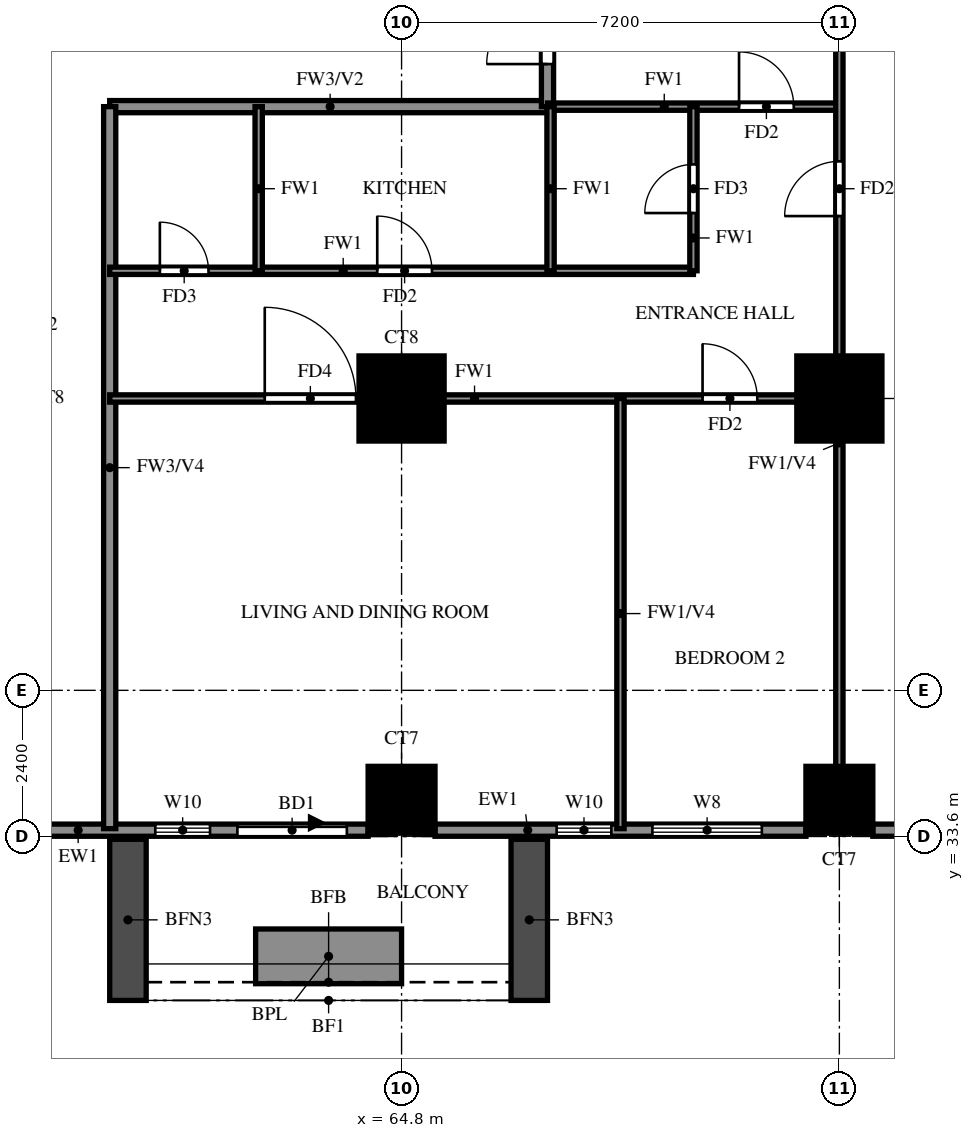
"""IFC4 building model, lengths in metres.
Left out: names, types, materials, properties, quantities, classifications, styles, units other than length and angle.
Written with IfcOpenShell. Run it as: python <this file> out.ifc"""

import sys

from ifc_helpers import new_model, si_unit, direction, frame, frame_2d, origin, origin_2d, place, context, subcontext, project, spatial, rectangle, extrude, source, transform, mapped, element, fill, save


model = new_model("IFC4")
c1 = context("Model", 3, precision=1e-05, world=origin(), true_north=direction((0.0, 1.0)))
c2 = subcontext(c1, "Body", "Model", "MODEL_VIEW")
j1 = project(units=[si_unit("LENGTHUNIT", "METRE"), si_unit("PLANEANGLEUNIT", "RADIAN")], contexts=[c1])
p1 = place(None, origin())
s1 = spatial("IfcSite", under=j1, at=p1, CompositionType="ELEMENT")
p2 = place(p1, origin())
s2 = spatial("IfcBuilding", under=s1, at=p2, CompositionType="ELEMENT")
p3 = place(p2, frame((0.0, 0.0, 37.5)))
s3 = spatial("IfcBuildingStorey", under=s2, at=p3, CompositionType="ELEMENT", Elevation=37.5)
m1 = source(origin(), c2, "Body", "SweptSolid", [
    extrude(rectangle(XDim=1.1, YDim=1.1, at=origin_2d()), origin(), (0.0, 0.0, 1.0), 3.18),
])
for number, where, z_axis, x_axis in (
    (1, (64.8, 34.2, 0.0), (0.0, 0.0, 1.0), (1.0, 0.0, 0.0)),
    (2, (72.0, 34.2, 0.0), (0.0, 0.0, 1.0), (1.0, 0.0, 0.0)),
):
    element("IfcColumn", number, at=place(p3, frame(where, z_axis=z_axis, x_axis=x_axis)), inside=s3, PredefinedType="COLUMN", context=c2, shape_type="MappedRepresentation", body=[
        mapped(m1, transform((0.0, 0.0, 0.0))),
    ])
m2 = source(origin(), c2, "Body", "SweptSolid", [
    extrude(rectangle(XDim=1.4, YDim=1.4, at=origin_2d()), origin(), (0.0, 0.0, 1.0), 3.18),
])
for number, where, z_axis, x_axis in (
    (3, (64.8, 40.8, 0.0), (0.0, 0.0, 1.0), (1.0, 0.0, 0.0)),
    (4, (72.0, 40.8, 0.0), (0.0, 0.0, 1.0), (1.0, 0.0, 0.0)),
):
    element("IfcColumn", number, at=place(p3, frame(where, z_axis=z_axis, x_axis=x_axis)), inside=s3, PredefinedType="COLUMN", context=c2, shape_type="MappedRepresentation", body=[
        mapped(m2, transform((0.0, 0.0, 0.0))),
    ])
p4 = place(p3, frame((78.74, 41.118, 0.0), z_axis=(0.0, 0.0, 1.0), x_axis=(-0.707106781187, 0.707106781187, 0.0)))
e5 = element("IfcWall", 5, at=p4, inside=s3, PredefinedType="SOLIDWALL", context=c2, shape_type="SweptSolid", body=[
    extrude(rectangle(XDim=9.874, YDim=0.2, at=frame_2d((4.937, 0.0))), origin(), (0.0, 0.0, 1.0), 3.18),
])
p5 = place(p3, frame((58.8, 33.7, 0.0), z_axis=(0.0, 0.0, 1.0), x_axis=(1.0, 0.0, 0.0)))
e6 = element("IfcWall", 6, at=p5, inside=s3, PredefinedType="SOLIDWALL", context=c2, shape_type="SweptSolid", body=[
    extrude(rectangle(XDim=5.45, YDim=0.2, at=frame_2d((2.725, 0.0))), origin(), (0.0, 0.0, 1.0), 3.18),
])
p6 = place(p5, frame((3.3, 0.0, 0.0)))
e7 = element("IfcOpeningElement", 7, at=p6, cuts=e6, PredefinedType="OPENING", context=c2, shape_type="SweptSolid", body=[
    extrude(rectangle(XDim=1.8, YDim=2.4, at=frame_2d((0.9, 1.2))), frame((0.0, 0.11, 0.0), z_axis=(0.0, -1.0, 0.0), x_axis=(1.0, 0.0, 0.0)), (0.0, 0.0, 1.0), 0.22),
])
p7 = place(p5, frame((1.95, 0.0, 0.6)))
e8 = element("IfcOpeningElement", 8, at=p7, cuts=e6, PredefinedType="OPENING", context=c2, shape_type="SweptSolid", body=[
    extrude(rectangle(XDim=0.9, YDim=2.4, at=frame_2d((0.45, 1.2))), frame((0.0, 0.11, 0.0), z_axis=(0.0, -1.0, 0.0), x_axis=(1.0, 0.0, 0.0)), (0.0, 0.0, 1.0), 0.22),
])
p8 = place(p3, frame((65.35, 33.7, 0.0), z_axis=(0.0, 0.0, 1.0), x_axis=(1.0, 0.0, 0.0)))
e9 = element("IfcWall", 9, at=p8, inside=s3, PredefinedType="SOLIDWALL", context=c2, shape_type="SweptSolid", body=[
    extrude(rectangle(XDim=6.1, YDim=0.2, at=frame_2d((3.05, 0.0))), origin(), (0.0, 0.0, 1.0), 3.18),
])
p9 = place(p8, frame((3.575, 0.0, 0.6)))
e10 = element("IfcOpeningElement", 10, at=p9, cuts=e9, PredefinedType="OPENING", context=c2, shape_type="SweptSolid", body=[
    extrude(rectangle(XDim=1.8, YDim=2.4, at=frame_2d((0.9, 1.2))), frame((0.0, 0.11, 0.0), z_axis=(0.0, -1.0, 0.0), x_axis=(1.0, 0.0, 0.0)), (0.0, 0.0, 1.0), 0.22),
])
p10 = place(p8, frame((2.0, 0.0, 0.6)))
e11 = element("IfcOpeningElement", 11, at=p10, cuts=e9, PredefinedType="OPENING", context=c2, shape_type="SweptSolid", body=[
    extrude(rectangle(XDim=0.9, YDim=2.4, at=frame_2d((0.45, 1.2))), frame((0.0, 0.11, 0.0), z_axis=(0.0, -1.0, 0.0), x_axis=(1.0, 0.0, 0.0)), (0.0, 0.0, 1.0), 0.22),
])
p11 = place(p3, frame((72.55, 33.7, 0.0), z_axis=(0.0, 0.0, 1.0), x_axis=(1.0, 0.0, 0.0)))
e12 = element("IfcWall", 12, at=p11, inside=s3, PredefinedType="SOLIDWALL", context=c2, shape_type="SweptSolid", body=[
    extrude(rectangle(XDim=13.609, YDim=0.2, at=frame_2d((6.804, 0.0))), origin(), (0.0, 0.0, 1.0), 3.18),
])
p12 = place(p11, frame((4.55, 0.0, 0.0)))
e13 = element("IfcOpeningElement", 13, at=p12, cuts=e12, PredefinedType="OPENING", context=c2, shape_type="SweptSolid", body=[
    extrude(rectangle(XDim=1.8, YDim=2.4, at=frame_2d((0.9, 1.2))), frame((0.0, 0.11, 0.0), z_axis=(0.0, -1.0, 0.0), x_axis=(1.0, 0.0, 0.0)), (0.0, 0.0, 1.0), 0.22),
])
p13 = place(p11, frame((0.425, 0.0, 0.6)))
e14 = element("IfcOpeningElement", 14, at=p13, cuts=e12, PredefinedType="OPENING", context=c2, shape_type="SweptSolid", body=[
    extrude(rectangle(XDim=1.2, YDim=2.4, at=frame_2d((0.6, 1.2))), frame((0.0, 0.11, 0.0), z_axis=(0.0, -1.0, 0.0), x_axis=(1.0, 0.0, 0.0)), (0.0, 0.0, 1.0), 0.22),
])
p14 = place(p11, frame((2.75, 0.0, 0.6)))
e15 = element("IfcOpeningElement", 15, at=p14, cuts=e12, PredefinedType="OPENING", context=c2, shape_type="SweptSolid", body=[
    extrude(rectangle(XDim=1.2, YDim=2.4, at=frame_2d((0.6, 1.2))), frame((0.0, 0.11, 0.0), z_axis=(0.0, -1.0, 0.0), x_axis=(1.0, 0.0, 0.0)), (0.0, 0.0, 1.0), 0.22),
])
p15 = place(p11, frame((6.8, 0.0, 0.6)))
e16 = element("IfcOpeningElement", 16, at=p15, cuts=e12, PredefinedType="OPENING", context=c2, shape_type="SweptSolid", body=[
    extrude(rectangle(XDim=0.9, YDim=2.4, at=frame_2d((0.45, 1.2))), frame((0.0, 0.11, 0.0), z_axis=(0.0, -1.0, 0.0), x_axis=(1.0, 0.0, 0.0)), (0.0, 0.0, 1.0), 0.22),
])
p16 = place(p11, frame((10.029, 0.0, 0.6)))
e17 = element("IfcOpeningElement", 17, at=p16, cuts=e12, PredefinedType="OPENING", context=c2, shape_type="SweptSolid", body=[
    extrude(rectangle(XDim=2.4, YDim=2.4, at=frame_2d((1.2, 1.2))), frame((0.0, 0.11, 0.0), z_axis=(0.0, -1.0, 0.0), x_axis=(1.0, 0.0, 0.0)), (0.0, 0.0, 1.0), 0.22),
])
for number, where, z_axis, x_axis in (
    (18, (60.3, 33.55, 0.0), (0.0, 0.0, 1.0), (0.0, -1.0, 0.0)),
    (19, (66.9, 33.55, 0.0), (0.0, 0.0, 1.0), (0.0, -1.0, 0.0)),
):
    element("IfcWall", number, at=place(p3, frame(where, z_axis=z_axis, x_axis=x_axis)), inside=s3, PredefinedType="SOLIDWALL", context=c2, shape_type="SweptSolid", body=[
        extrude(rectangle(XDim=2.65, YDim=0.6, at=frame_2d((1.325, 0.0))), origin(), (0.0, 0.0, 1.0), 2.85),
    ])
p17 = place(p3, frame((62.4, 31.625, 0.0), z_axis=(0.0, 0.0, 1.0), x_axis=(1.0, 0.0, 0.0)))
e20 = element("IfcWall", 20, at=p17, inside=s3, PredefinedType="SOLIDWALL", context=c2, shape_type="SweptSolid", body=[
    extrude(rectangle(XDim=2.4, YDim=0.9, at=frame_2d((1.2, 0.0))), origin(), (0.0, 0.0, 1.0), 0.9),
])
p18 = place(p3, frame((60.0, 45.6, 0.0), z_axis=(0.0, 0.0, 1.0), x_axis=(1.0, 0.0, 0.0)))
e21 = element("IfcWall", 21, at=p18, inside=s3, PredefinedType="SOLIDWALL", context=c2, shape_type="SweptSolid", body=[
    extrude(rectangle(XDim=7.25, YDim=0.2, at=frame_2d((3.625, 0.0))), origin(), (0.0, 0.0, 1.0), 3.18),
])
p19 = place(p3, frame((60.0, 33.725, 0.0), z_axis=(0.0, 0.0, 1.0), x_axis=(0.0, 1.0, 0.0)))
e22 = element("IfcWall", 22, at=p19, inside=s3, PredefinedType="SOLIDWALL", context=c2, shape_type="SweptSolid", body=[
    extrude(rectangle(XDim=11.875, YDim=0.2, at=frame_2d((5.938, 0.0))), origin(), (0.0, 0.0, 1.0), 2.28),
])
p20 = place(p3, frame((67.2, 45.6, 0.0), z_axis=(0.0, 0.0, 1.0), x_axis=(0.0, 1.0, 0.0)))
e23 = element("IfcWall", 23, at=p20, inside=s3, PredefinedType="SOLIDWALL", context=c2, shape_type="SweptSolid", body=[
    extrude(rectangle(XDim=8.4, YDim=0.2, at=frame_2d((4.2, 0.0))), origin(), (0.0, 0.0, 1.0), 3.18),
])
p21 = place(p20, frame((0.7, 0.0, 0.0)))
e24 = element("IfcOpeningElement", 24, at=p21, cuts=e23, PredefinedType="OPENING", context=c2, shape_type="SweptSolid", body=[
    extrude(rectangle(XDim=1.0, YDim=2.1, at=frame_2d((0.5, 1.05))), frame((0.0, 0.11, 0.0), z_axis=(0.0, -1.0, 0.0), x_axis=(1.0, 0.0, 0.0)), (0.0, 0.0, 1.0), 0.22),
])
p22 = place(p3, frame((60.0, 40.8, 0.0), z_axis=(0.0, 0.0, 1.0), x_axis=(1.0, 0.0, 0.0)))
e25 = element("IfcWall", 25, at=p22, inside=s3, PredefinedType="PARTITIONING", context=c2, shape_type="SweptSolid", body=[
    extrude(rectangle(XDim=12.0, YDim=0.12, at=frame_2d((6.0, 0.0))), origin(), (0.0, 0.0, 1.0), 3.18),
])
p23 = place(p22, frame((9.75, 0.0, 0.0)))
e26 = element("IfcOpeningElement", 26, at=p23, cuts=e25, PredefinedType="OPENING", context=c2, shape_type="SweptSolid", body=[
    extrude(rectangle(XDim=0.9, YDim=2.1, at=frame_2d((0.45, 1.05))), frame((0.0, 0.07, 0.0), z_axis=(0.0, -1.0, 0.0), x_axis=(1.0, 0.0, 0.0)), (0.0, 0.0, 1.0), 0.14),
])
p24 = place(p22, frame((2.55, 0.0, 0.0)))
e27 = element("IfcOpeningElement", 27, at=p24, cuts=e25, PredefinedType="OPENING", context=c2, shape_type="SweptSolid", body=[
    extrude(rectangle(XDim=1.5, YDim=2.1, at=frame_2d((0.75, 1.05))), frame((0.0, 0.07, 0.0), z_axis=(0.0, -1.0, 0.0), x_axis=(1.0, 0.0, 0.0)), (0.0, 0.0, 1.0), 0.14),
])
p25 = place(p3, frame((60.0, 42.9, 0.0), z_axis=(0.0, 0.0, 1.0), x_axis=(1.0, 0.0, 0.0)))
e28 = element("IfcWall", 28, at=p25, inside=s3, PredefinedType="PARTITIONING", context=c2, shape_type="SweptSolid", body=[
    extrude(rectangle(XDim=9.6, YDim=0.12, at=frame_2d((4.8, 0.0))), origin(), (0.0, 0.0, 1.0), 3.18),
])
p26 = place(p25, frame((4.4, 0.0, 0.0)))
e29 = element("IfcOpeningElement", 29, at=p26, cuts=e28, PredefinedType="OPENING", context=c2, shape_type="SweptSolid", body=[
    extrude(rectangle(XDim=0.9, YDim=2.1, at=frame_2d((0.45, 1.05))), frame((0.0, 0.07, 0.0), z_axis=(0.0, -1.0, 0.0), x_axis=(1.0, 0.0, 0.0)), (0.0, 0.0, 1.0), 0.14),
])
p27 = place(p25, frame((0.825, 0.0, 0.0)))
e30 = element("IfcOpeningElement", 30, at=p27, cuts=e28, PredefinedType="OPENING", context=c2, shape_type="SweptSolid", body=[
    extrude(rectangle(XDim=0.8, YDim=2.1, at=frame_2d((0.4, 1.05))), frame((0.0, 0.07, 0.0), z_axis=(0.0, -1.0, 0.0), x_axis=(1.0, 0.0, 0.0)), (0.0, 0.0, 1.0), 0.14),
])
p28 = place(p3, frame((67.2, 45.6, 0.0), z_axis=(0.0, 0.0, 1.0), x_axis=(1.0, 0.0, 0.0)))
e31 = element("IfcWall", 31, at=p28, inside=s3, PredefinedType="PARTITIONING", context=c2, shape_type="SweptSolid", body=[
    extrude(rectangle(XDim=4.8, YDim=0.12, at=frame_2d((2.4, 0.0))), origin(), (0.0, 0.0, 1.0), 3.18),
])
p29 = place(p28, frame((3.15, 0.0, 0.0)))
e32 = element("IfcOpeningElement", 32, at=p29, cuts=e31, PredefinedType="OPENING", context=c2, shape_type="SweptSolid", body=[
    extrude(rectangle(XDim=0.9, YDim=2.1, at=frame_2d((0.45, 1.05))), frame((0.0, 0.07, 0.0), z_axis=(0.0, -1.0, 0.0), x_axis=(1.0, 0.0, 0.0)), (0.0, 0.0, 1.0), 0.14),
])
for number, where, z_axis, x_axis in (
    (33, (62.45, 42.9, 0.0), (0.0, 0.0, 1.0), (0.0, 1.0, 0.0)),
    (34, (67.25, 42.9, 0.0), (0.0, 0.0, 1.0), (0.0, 1.0, 0.0)),
):
    element("IfcWall", number, at=place(p3, frame(where, z_axis=z_axis, x_axis=x_axis)), inside=s3, PredefinedType="PARTITIONING", context=c2, shape_type="SweptSolid", body=[
        extrude(rectangle(XDim=2.7, YDim=0.12, at=frame_2d((1.35, 0.0))), origin(), (0.0, 0.0, 1.0), 3.18),
    ])
p30 = place(p3, frame((68.4, 33.725, 0.0), z_axis=(0.0, 0.0, 1.0), x_axis=(0.0, 1.0, 0.0)))
e35 = element("IfcWall", 35, at=p30, inside=s3, PredefinedType="PARTITIONING", context=c2, shape_type="SweptSolid", body=[
    extrude(rectangle(XDim=7.075, YDim=0.12, at=frame_2d((3.538, 0.0))), origin(), (0.0, 0.0, 1.0), 2.28),
])
p31 = place(p3, frame((69.6, 42.9, 0.0), z_axis=(0.0, 0.0, 1.0), x_axis=(0.0, 1.0, 0.0)))
e36 = element("IfcWall", 36, at=p31, inside=s3, PredefinedType="PARTITIONING", context=c2, shape_type="SweptSolid", body=[
    extrude(rectangle(XDim=2.7, YDim=0.12, at=frame_2d((1.35, 0.0))), origin(), (0.0, 0.0, 1.0), 3.18),
])
p32 = place(p31, frame((0.95, 0.0, 0.0)))
e37 = element("IfcOpeningElement", 37, at=p32, cuts=e36, PredefinedType="OPENING", context=c2, shape_type="SweptSolid", body=[
    extrude(rectangle(XDim=0.8, YDim=2.1, at=frame_2d((0.4, 1.05))), frame((0.0, 0.07, 0.0), z_axis=(0.0, -1.0, 0.0), x_axis=(1.0, 0.0, 0.0)), (0.0, 0.0, 1.0), 0.14),
])
p33 = place(p3, frame((72.0, 33.725, 0.0), z_axis=(0.0, 0.0, 1.0), x_axis=(0.0, 1.0, 0.0)))
e38 = element("IfcWall", 38, at=p33, inside=s3, PredefinedType="PARTITIONING", context=c2, shape_type="SweptSolid", body=[
    extrude(rectangle(XDim=14.098, YDim=0.12, at=frame_2d((7.049, 0.0))), origin(), (0.0, 0.0, 1.0), 2.28),
])
p34 = place(p33, frame((10.075, 0.0, 0.0)))
e39 = element("IfcOpeningElement", 39, at=p34, cuts=e38, PredefinedType="OPENING", context=c2, shape_type="SweptSolid", body=[
    extrude(rectangle(XDim=0.9, YDim=2.1, at=frame_2d((0.45, 1.05))), frame((0.0, 0.07, 0.0), z_axis=(0.0, -1.0, 0.0), x_axis=(1.0, 0.0, 0.0)), (0.0, 0.0, 1.0), 0.14),
])
p35 = place(p6, origin())
e40 = element("IfcDoor", 40, at=p35, inside=s3, OperationType="DOUBLE_DOOR_SLIDING", PredefinedType="DOOR", context=c2, shape_type="SweptSolid", body=[
    extrude(rectangle(XDim=1.8, YDim=2.4, at=frame_2d((0.9, 1.2))), frame((0.0, 0.025, 0.0), z_axis=(0.0, -1.0, 0.0), x_axis=(1.0, 0.0, 0.0)), (0.0, 0.0, 1.0), 0.05),
])
fill(e7, e40)
p36 = place(p7, origin())
e41 = element("IfcWindow", 41, at=p36, inside=s3, PartitioningType="SINGLE_PANEL", PredefinedType="WINDOW", context=c2, shape_type="SweptSolid", body=[
    extrude(rectangle(XDim=0.9, YDim=2.4, at=frame_2d((0.45, 1.2))), frame((0.0, 0.03, 0.0), z_axis=(0.0, -1.0, 0.0), x_axis=(1.0, 0.0, 0.0)), (0.0, 0.0, 1.0), 0.06),
])
fill(e8, e41)
p37 = place(p9, origin())
e42 = element("IfcWindow", 42, at=p37, inside=s3, PartitioningType="DOUBLE_PANEL_VERTICAL", PredefinedType="WINDOW", context=c2, shape_type="SweptSolid", body=[
    extrude(rectangle(XDim=1.8, YDim=2.4, at=frame_2d((0.9, 1.2))), frame((0.0, 0.03, 0.0), z_axis=(0.0, -1.0, 0.0), x_axis=(1.0, 0.0, 0.0)), (0.0, 0.0, 1.0), 0.06),
])
fill(e10, e42)
p38 = place(p10, origin())
e43 = element("IfcWindow", 43, at=p38, inside=s3, PartitioningType="SINGLE_PANEL", PredefinedType="WINDOW", context=c2, shape_type="SweptSolid", body=[
    extrude(rectangle(XDim=0.9, YDim=2.4, at=frame_2d((0.45, 1.2))), frame((0.0, 0.03, 0.0), z_axis=(0.0, -1.0, 0.0), x_axis=(1.0, 0.0, 0.0)), (0.0, 0.0, 1.0), 0.06),
])
fill(e11, e43)
p39 = place(p29, origin())
e44 = element("IfcDoor", 44, at=p39, inside=s3, OperationType="SINGLE_SWING_RIGHT", PredefinedType="DOOR", context=c2, shape_type="SweptSolid", body=[
    extrude(rectangle(XDim=0.9, YDim=2.1, at=frame_2d((0.45, 1.05))), frame((0.0, 0.025, 0.0), z_axis=(0.0, -1.0, 0.0), x_axis=(1.0, 0.0, 0.0)), (0.0, 0.0, 1.0), 0.05),
])
fill(e32, e44)
p40 = place(p21, origin())
e45 = element("IfcDoor", 45, at=p40, inside=s3, OperationType="SINGLE_SWING_LEFT", PredefinedType="DOOR", context=c2, shape_type="SweptSolid", body=[
    extrude(rectangle(XDim=1.0, YDim=2.1, at=frame_2d((0.5, 1.05))), frame((0.0, 0.025, 0.0), z_axis=(0.0, -1.0, 0.0), x_axis=(1.0, 0.0, 0.0)), (0.0, 0.0, 1.0), 0.05),
])
fill(e24, e45)
p41 = place(p23, origin())
e46 = element("IfcDoor", 46, at=p41, inside=s3, OperationType="SINGLE_SWING_LEFT", PredefinedType="DOOR", context=c2, shape_type="SweptSolid", body=[
    extrude(rectangle(XDim=0.9, YDim=2.1, at=frame_2d((0.45, 1.05))), frame((0.0, 0.025, 0.0), z_axis=(0.0, -1.0, 0.0), x_axis=(1.0, 0.0, 0.0)), (0.0, 0.0, 1.0), 0.05),
])
fill(e26, e46)
p42 = place(p24, origin())
e47 = element("IfcDoor", 47, at=p42, inside=s3, OperationType="SINGLE_SWING_LEFT", PredefinedType="DOOR", context=c2, shape_type="SweptSolid", body=[
    extrude(rectangle(XDim=1.5, YDim=2.1, at=frame_2d((0.75, 1.05))), frame((0.0, 0.025, 0.0), z_axis=(0.0, -1.0, 0.0), x_axis=(1.0, 0.0, 0.0)), (0.0, 0.0, 1.0), 0.05),
])
fill(e27, e47)
p43 = place(p32, origin())
e48 = element("IfcDoor", 48, at=p43, inside=s3, OperationType="SINGLE_SWING_LEFT", PredefinedType="DOOR", context=c2, shape_type="SweptSolid", body=[
    extrude(rectangle(XDim=0.8, YDim=2.1, at=frame_2d((0.4, 1.05))), frame((0.0, 0.025, 0.0), z_axis=(0.0, -1.0, 0.0), x_axis=(1.0, 0.0, 0.0)), (0.0, 0.0, 1.0), 0.05),
])
fill(e37, e48)
p44 = place(p26, origin())
e49 = element("IfcDoor", 49, at=p44, inside=s3, OperationType="SINGLE_SWING_LEFT", PredefinedType="DOOR", context=c2, shape_type="SweptSolid", body=[
    extrude(rectangle(XDim=0.9, YDim=2.1, at=frame_2d((0.45, 1.05))), frame((0.0, 0.025, 0.0), z_axis=(0.0, -1.0, 0.0), x_axis=(1.0, 0.0, 0.0)), (0.0, 0.0, 1.0), 0.05),
])
fill(e29, e49)
p45 = place(p27, origin())
e50 = element("IfcDoor", 50, at=p45, inside=s3, OperationType="SINGLE_SWING_RIGHT", PredefinedType="DOOR", context=c2, shape_type="SweptSolid", body=[
    extrude(rectangle(XDim=0.8, YDim=2.1, at=frame_2d((0.4, 1.05))), frame((0.0, 0.025, 0.0), z_axis=(0.0, -1.0, 0.0), x_axis=(1.0, 0.0, 0.0)), (0.0, 0.0, 1.0), 0.05),
])
fill(e30, e50)
p46 = place(p34, origin())
e51 = element("IfcDoor", 51, at=p46, inside=s3, OperationType="SINGLE_SWING_LEFT", PredefinedType="DOOR", context=c2, shape_type="SweptSolid", body=[
    extrude(rectangle(XDim=0.9, YDim=2.1, at=frame_2d((0.45, 1.05))), frame((0.0, 0.025, 0.0), z_axis=(0.0, -1.0, 0.0), x_axis=(1.0, 0.0, 0.0)), (0.0, 0.0, 1.0), 0.05),
])
fill(e39, e51)
save(model, sys.argv[1])
